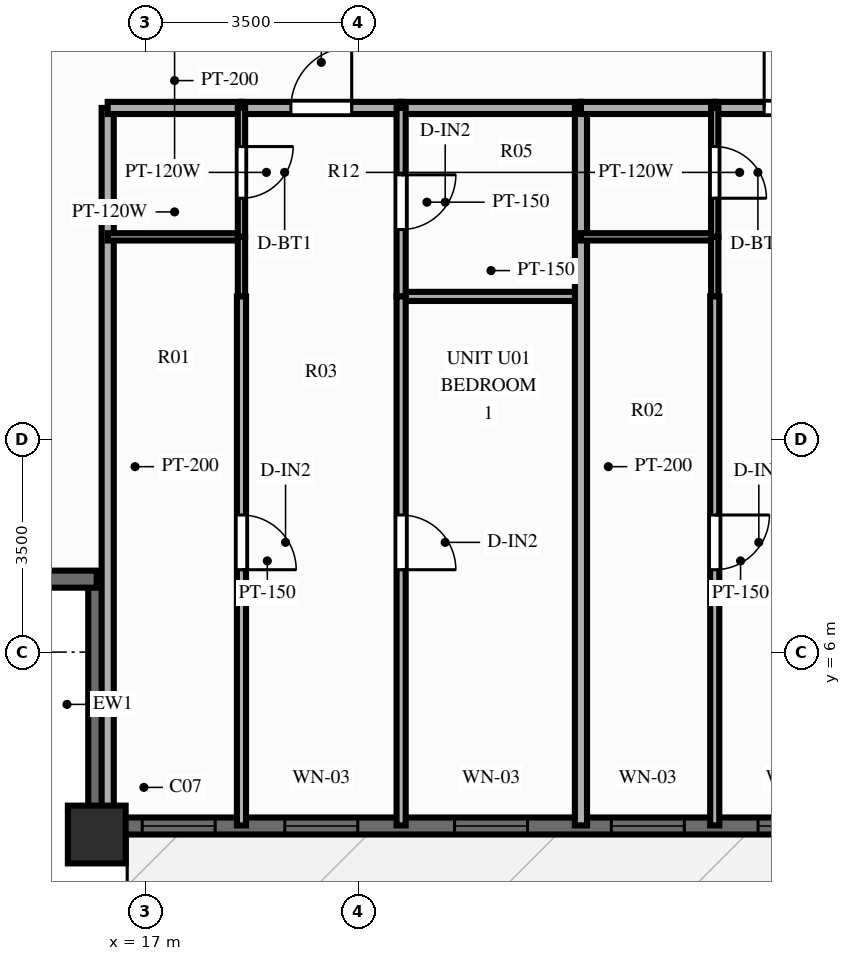
"""IFC4 building model, lengths in metres.
Left out: names, types, materials, properties, quantities, classifications, styles, units other than length and angle.
Written with IfcOpenShell. Run it as: python <this file> out.ifc"""

import sys

from ifc_helpers import new_model, si_unit, direction, frame, frame_2d, origin, origin_2d, place, context, subcontext, project, spatial, rectangle, extrude, source, transform, mapped, element, fill, save


model = new_model("IFC4")
c1 = context("Model", 3, precision=1e-05, world=origin(), true_north=direction((0.0, 1.0)))
c2 = subcontext(c1, "Body", "Model", "MODEL_VIEW")
j1 = project(units=[si_unit("LENGTHUNIT", "METRE"), si_unit("PLANEANGLEUNIT", "RADIAN")], contexts=[c1])
p1 = place(None, origin())
s1 = spatial("IfcSite", under=j1, at=p1, CompositionType="ELEMENT")
p2 = place(p1, origin())
s2 = spatial("IfcBuilding", under=s1, at=p2, CompositionType="ELEMENT")
p3 = place(p2, frame((0.0, 0.0, 83.85)))
s3 = spatial("IfcBuildingStorey", under=s2, at=p3, CompositionType="ELEMENT", Elevation=83.85)
m1 = source(origin(), c2, "Body", "SweptSolid", [
    extrude(rectangle(XDim=0.95, YDim=0.95, at=origin_2d()), origin(), (0.0, 0.0, 1.0), 3.0),
])
p4 = place(p3, frame((16.2, 3.0, 0.0), z_axis=(0.0, 0.0, 1.0), x_axis=(1.0, 0.0, 0.0)))
e1 = element("IfcColumn", 1, at=p4, inside=s3, PredefinedType="COLUMN", context=c2, shape_type="MappedRepresentation", body=[
    mapped(m1, transform((0.0, 0.0, 0.0), scale=1.0)),
])
p5 = place(p3, frame((16.2, 3.14, 0.0), z_axis=(0.0, 0.0, 1.0), x_axis=(1.0, 0.0, 0.0)))
e2 = element("IfcWall", 2, at=p5, inside=s3, PredefinedType="SOLIDWALL", context=c2, shape_type="SweptSolid", body=[
    extrude(rectangle(XDim=43.6, YDim=0.28, at=frame_2d((21.8, 0.0))), origin(), (0.0, 0.0, 1.0), 2.28),
])
p6 = place(p5, frame((0.748, 0.0, 0.25)))
e3 = element("IfcOpeningElement", 3, at=p6, cuts=e2, PredefinedType="OPENING", context=c2, shape_type="SweptSolid", body=[
    extrude(rectangle(XDim=1.2, YDim=1.5, at=frame_2d((0.6, 0.75))), frame((0.0, 0.152, 0.0), z_axis=(0.0, -1.0, 0.0), x_axis=(1.0, 0.0, 0.0)), (0.0, 0.0, 1.0), 0.304),
])
p7 = place(p5, frame((3.093, 0.0, 0.25)))
e4 = element("IfcOpeningElement", 4, at=p7, cuts=e2, PredefinedType="OPENING", context=c2, shape_type="SweptSolid", body=[
    extrude(rectangle(XDim=1.2, YDim=1.5, at=frame_2d((0.6, 0.75))), frame((0.0, 0.152, 0.0), z_axis=(0.0, -1.0, 0.0), x_axis=(1.0, 0.0, 0.0)), (0.0, 0.0, 1.0), 0.304),
])
p8 = place(p5, frame((5.885, 0.0, 0.25)))
e5 = element("IfcOpeningElement", 5, at=p8, cuts=e2, PredefinedType="OPENING", context=c2, shape_type="SweptSolid", body=[
    extrude(rectangle(XDim=1.2, YDim=1.5, at=frame_2d((0.6, 0.75))), frame((0.0, 0.152, 0.0), z_axis=(0.0, -1.0, 0.0), x_axis=(1.0, 0.0, 0.0)), (0.0, 0.0, 1.0), 0.304),
])
p9 = place(p5, frame((8.463, 0.0, 0.25)))
e6 = element("IfcOpeningElement", 6, at=p9, cuts=e2, PredefinedType="OPENING", context=c2, shape_type="SweptSolid", body=[
    extrude(rectangle(XDim=1.2, YDim=1.5, at=frame_2d((0.6, 0.75))), frame((0.0, 0.152, 0.0), z_axis=(0.0, -1.0, 0.0), x_axis=(1.0, 0.0, 0.0)), (0.0, 0.0, 1.0), 0.304),
])
p10 = place(p5, frame((10.876, 0.0, 0.25)))
e7 = element("IfcOpeningElement", 7, at=p10, cuts=e2, PredefinedType="OPENING", context=c2, shape_type="SweptSolid", body=[
    extrude(rectangle(XDim=1.2, YDim=1.5, at=frame_2d((0.6, 0.75))), frame((0.0, 0.152, 0.0), z_axis=(0.0, -1.0, 0.0), x_axis=(1.0, 0.0, 0.0)), (0.0, 0.0, 1.0), 0.304),
])
p11 = place(p5, frame((13.287, 0.0, 0.25)))
e8 = element("IfcOpeningElement", 8, at=p11, cuts=e2, PredefinedType="OPENING", context=c2, shape_type="SweptSolid", body=[
    extrude(rectangle(XDim=1.2, YDim=1.5, at=frame_2d((0.6, 0.75))), frame((0.0, 0.152, 0.0), z_axis=(0.0, -1.0, 0.0), x_axis=(1.0, 0.0, 0.0)), (0.0, 0.0, 1.0), 0.304),
])
p12 = place(p5, frame((16.521, 0.0, 0.25)))
e9 = element("IfcOpeningElement", 9, at=p12, cuts=e2, PredefinedType="OPENING", context=c2, shape_type="SweptSolid", body=[
    extrude(rectangle(XDim=1.2, YDim=1.5, at=frame_2d((0.6, 0.75))), frame((0.0, 0.152, 0.0), z_axis=(0.0, -1.0, 0.0), x_axis=(1.0, 0.0, 0.0)), (0.0, 0.0, 1.0), 0.304),
])
p13 = place(p5, frame((22.938, 0.0, 0.0), z_axis=(0.0, 0.0, 1.0), x_axis=(-1.0, 0.0, 0.0)))
e10 = element("IfcOpeningElement", 10, at=p13, cuts=e2, PredefinedType="OPENING", context=c2, shape_type="SweptSolid", body=[
    extrude(rectangle(XDim=1.1, YDim=2.15, at=frame_2d((0.55, 1.075))), frame((0.0, 0.152, 0.0), z_axis=(0.0, -1.0, 0.0), x_axis=(1.0, 0.0, 0.0)), (0.0, 0.0, 1.0), 0.304),
])
p14 = place(p5, frame((26.657, 0.0, 0.25)))
e11 = element("IfcOpeningElement", 11, at=p14, cuts=e2, PredefinedType="OPENING", context=c2, shape_type="SweptSolid", body=[
    extrude(rectangle(XDim=0.95, YDim=1.5, at=frame_2d((0.475, 0.75))), frame((0.0, 0.152, 0.0), z_axis=(0.0, -1.0, 0.0), x_axis=(1.0, 0.0, 0.0)), (0.0, 0.0, 1.0), 0.304),
])
p15 = place(p5, frame((28.965, 0.0, 0.25)))
e12 = element("IfcOpeningElement", 12, at=p15, cuts=e2, PredefinedType="OPENING", context=c2, shape_type="SweptSolid", body=[
    extrude(rectangle(XDim=0.7, YDim=1.5, at=frame_2d((0.35, 0.75))), frame((0.0, 0.152, 0.0), z_axis=(0.0, -1.0, 0.0), x_axis=(1.0, 0.0, 0.0)), (0.0, 0.0, 1.0), 0.304),
])
p16 = place(p5, frame((31.158, 0.0, 0.25)))
e13 = element("IfcOpeningElement", 13, at=p16, cuts=e2, PredefinedType="OPENING", context=c2, shape_type="SweptSolid", body=[
    extrude(rectangle(XDim=1.2, YDim=1.5, at=frame_2d((0.6, 0.75))), frame((0.0, 0.152, 0.0), z_axis=(0.0, -1.0, 0.0), x_axis=(1.0, 0.0, 0.0)), (0.0, 0.0, 1.0), 0.304),
])
p17 = place(p5, frame((35.992, 0.0, 0.25)))
e14 = element("IfcOpeningElement", 14, at=p17, cuts=e2, PredefinedType="OPENING", context=c2, shape_type="SweptSolid", body=[
    extrude(rectangle(XDim=1.2, YDim=1.5, at=frame_2d((0.6, 0.75))), frame((0.0, 0.152, 0.0), z_axis=(0.0, -1.0, 0.0), x_axis=(1.0, 0.0, 0.0)), (0.0, 0.0, 1.0), 0.304),
])
p18 = place(p5, frame((40.885, 0.0, 0.25)))
e15 = element("IfcOpeningElement", 15, at=p18, cuts=e2, PredefinedType="OPENING", context=c2, shape_type="SweptSolid", body=[
    extrude(rectangle(XDim=1.2, YDim=1.5, at=frame_2d((0.6, 0.75))), frame((0.0, 0.152, 0.0), z_axis=(0.0, -1.0, 0.0), x_axis=(1.0, 0.0, 0.0)), (0.0, 0.0, 1.0), 0.304),
])
for number, where, z_axis, x_axis in (
    (16, (16.2, 3.08, 0.0), (0.0, 0.0, 1.0), (0.0, 1.0, 0.0)),
    (17, (12.08, 7.2, 0.0), (0.0, 0.0, 1.0), (1.0, 0.0, 0.0)),
):
    element("IfcWall", number, at=place(p3, frame(where, z_axis=z_axis, x_axis=x_axis)), inside=s3, PredefinedType="SOLIDWALL", context=c2, shape_type="SweptSolid", body=[
        extrude(rectangle(XDim=4.12, YDim=0.28, at=frame_2d((2.06, 0.0))), origin(), (0.0, 0.0, 1.0), 2.28),
    ])
p19 = place(p3, frame((16.38, 14.95, 0.0), z_axis=(0.0, 0.0, 1.0), x_axis=(0.0, -1.0, 0.0)))
e18 = element("IfcWall", 18, at=p19, inside=s3, PredefinedType="PARTITIONING", context=c2, shape_type="SweptSolid", body=[
    extrude(rectangle(XDim=11.8, YDim=0.2, at=frame_2d((5.9, 0.0))), origin(), (0.0, 0.0, 1.0), 2.79),
])
p20 = place(p3, frame((16.38, 14.95, 0.0), z_axis=(0.0, 0.0, 1.0), x_axis=(1.0, 0.0, 0.0)))
e19 = element("IfcWall", 19, at=p20, inside=s3, PredefinedType="PARTITIONING", context=c2, shape_type="SweptSolid", body=[
    extrude(rectangle(XDim=2.2, YDim=0.2, at=frame_2d((1.1, 0.0))), origin(), (0.0, 0.0, 1.0), 2.79),
])
p21 = place(p3, frame((18.58, 14.95, 0.0), z_axis=(0.0, 0.0, 1.0), x_axis=(1.0, 0.0, 0.0)))
e20 = element("IfcWall", 20, at=p21, inside=s3, PredefinedType="PARTITIONING", context=c2, shape_type="SweptSolid", body=[
    extrude(rectangle(XDim=2.625, YDim=0.2, at=frame_2d((1.313, 0.0))), origin(), (0.0, 0.0, 1.0), 2.79),
])
p22 = place(p21, frame((0.813, 0.0, 0.0)))
e21 = element("IfcOpeningElement", 21, at=p22, cuts=e20, PredefinedType="OPENING", context=c2, shape_type="SweptSolid", body=[
    extrude(rectangle(XDim=1.0, YDim=2.15, at=frame_2d((0.5, 1.075))), frame((0.0, 0.112, 0.0), z_axis=(0.0, -1.0, 0.0), x_axis=(1.0, 0.0, 0.0)), (0.0, 0.0, 1.0), 0.224),
])
p23 = place(p3, frame((21.206, 14.95, 0.0), z_axis=(0.0, 0.0, 1.0), x_axis=(1.0, 0.0, 0.0)))
e22 = element("IfcWall", 22, at=p23, inside=s3, PredefinedType="PARTITIONING", context=c2, shape_type="SweptSolid", body=[
    extrude(rectangle(XDim=2.958, YDim=0.2, at=frame_2d((1.479, 0.0))), origin(), (0.0, 0.0, 1.0), 2.79),
])
p24 = place(p3, frame((16.38, 12.83, 0.0), z_axis=(0.0, 0.0, 1.0), x_axis=(1.0, 0.0, 0.0)))
e23 = element("IfcWall", 23, at=p24, inside=s3, PredefinedType="PARTITIONING", context=c2, shape_type="SweptSolid", body=[
    extrude(rectangle(XDim=2.2, YDim=0.12, at=frame_2d((1.1, 0.0))), origin(), (0.0, 0.0, 1.0), 2.79),
])
p25 = place(p3, frame((21.206, 11.85, 0.0), z_axis=(0.0, 0.0, 1.0), x_axis=(1.0, 0.0, 0.0)))
e24 = element("IfcWall", 24, at=p25, inside=s3, PredefinedType="PARTITIONING", context=c2, shape_type="SweptSolid", body=[
    extrude(rectangle(XDim=2.958, YDim=0.15, at=frame_2d((1.479, 0.0))), origin(), (0.0, 0.0, 1.0), 2.79),
])
p26 = place(p3, frame((18.58, 14.95, 0.0), z_axis=(0.0, 0.0, 1.0), x_axis=(0.0, -1.0, 0.0)))
e25 = element("IfcWall", 25, at=p26, inside=s3, PredefinedType="PARTITIONING", context=c2, shape_type="SweptSolid", body=[
    extrude(rectangle(XDim=2.12, YDim=0.12, at=frame_2d((1.06, 0.0))), origin(), (0.0, 0.0, 1.0), 2.79),
])
p27 = place(p26, frame((0.635, 0.0, 0.0)))
e26 = element("IfcOpeningElement", 26, at=p27, cuts=e25, PredefinedType="OPENING", context=c2, shape_type="SweptSolid", body=[
    extrude(rectangle(XDim=0.85, YDim=2.05, at=frame_2d((0.425, 1.025))), frame((0.0, 0.072, 0.0), z_axis=(0.0, -1.0, 0.0), x_axis=(1.0, 0.0, 0.0)), (0.0, 0.0, 1.0), 0.144),
])
p28 = place(p3, frame((18.58, 12.83, 0.0), z_axis=(0.0, 0.0, 1.0), x_axis=(0.0, -1.0, 0.0)))
e27 = element("IfcWall", 27, at=p28, inside=s3, PredefinedType="PARTITIONING", context=c2, shape_type="SweptSolid", body=[
    extrude(rectangle(XDim=0.98, YDim=0.12, at=frame_2d((0.49, 0.0))), origin(), (0.0, 0.0, 1.0), 2.79),
])
p29 = place(p3, frame((18.58, 11.85, 0.0), z_axis=(0.0, 0.0, 1.0), x_axis=(0.0, -1.0, 0.0)))
e28 = element("IfcWall", 28, at=p29, inside=s3, PredefinedType="PARTITIONING", context=c2, shape_type="SweptSolid", body=[
    extrude(rectangle(XDim=8.7, YDim=0.15, at=frame_2d((4.35, 0.0))), origin(), (0.0, 0.0, 1.0), 2.79),
])
p30 = place(p29, frame((3.595, 0.0, 0.0)))
e29 = element("IfcOpeningElement", 29, at=p30, cuts=e28, PredefinedType="OPENING", context=c2, shape_type="SweptSolid", body=[
    extrude(rectangle(XDim=0.9, YDim=2.1, at=frame_2d((0.45, 1.05))), frame((0.0, 0.087, 0.0), z_axis=(0.0, -1.0, 0.0), x_axis=(1.0, 0.0, 0.0)), (0.0, 0.0, 1.0), 0.174),
])
p31 = place(p3, frame((21.206, 14.95, 0.0), z_axis=(0.0, 0.0, 1.0), x_axis=(0.0, -1.0, 0.0)))
e30 = element("IfcWall", 30, at=p31, inside=s3, PredefinedType="PARTITIONING", context=c2, shape_type="SweptSolid", body=[
    extrude(rectangle(XDim=3.1, YDim=0.15, at=frame_2d((1.55, 0.0))), origin(), (0.0, 0.0, 1.0), 2.79),
])
p32 = place(p31, frame((1.1, 0.0, 0.0)))
e31 = element("IfcOpeningElement", 31, at=p32, cuts=e30, PredefinedType="OPENING", context=c2, shape_type="SweptSolid", body=[
    extrude(rectangle(XDim=0.9, YDim=2.1, at=frame_2d((0.45, 1.05))), frame((0.0, 0.087, 0.0), z_axis=(0.0, -1.0, 0.0), x_axis=(1.0, 0.0, 0.0)), (0.0, 0.0, 1.0), 0.174),
])
p33 = place(p3, frame((21.206, 11.85, 0.0), z_axis=(0.0, 0.0, 1.0), x_axis=(0.0, -1.0, 0.0)))
e32 = element("IfcWall", 32, at=p33, inside=s3, PredefinedType="PARTITIONING", context=c2, shape_type="SweptSolid", body=[
    extrude(rectangle(XDim=8.7, YDim=0.15, at=frame_2d((4.35, 0.0))), origin(), (0.0, 0.0, 1.0), 2.79),
])
p34 = place(p33, frame((3.595, 0.0, 0.0)))
e33 = element("IfcOpeningElement", 33, at=p34, cuts=e32, PredefinedType="OPENING", context=c2, shape_type="SweptSolid", body=[
    extrude(rectangle(XDim=0.9, YDim=2.1, at=frame_2d((0.45, 1.05))), frame((0.0, 0.087, 0.0), z_axis=(0.0, -1.0, 0.0), x_axis=(1.0, 0.0, 0.0)), (0.0, 0.0, 1.0), 0.174),
])
p35 = place(p3, frame((24.163, 14.95, 0.0), z_axis=(0.0, 0.0, 1.0), x_axis=(0.0, -1.0, 0.0)))
e34 = element("IfcWall", 34, at=p35, inside=s3, PredefinedType="PARTITIONING", context=c2, shape_type="SweptSolid", body=[
    extrude(rectangle(XDim=11.8, YDim=0.2, at=frame_2d((5.9, 0.0))), origin(), (0.0, 0.0, 1.0), 2.79),
])
p36 = place(p3, frame((24.163, 14.95, 0.0), z_axis=(0.0, 0.0, 1.0), x_axis=(1.0, 0.0, 0.0)))
e35 = element("IfcWall", 35, at=p36, inside=s3, PredefinedType="PARTITIONING", context=c2, shape_type="SweptSolid", body=[
    extrude(rectangle(XDim=2.2, YDim=0.2, at=frame_2d((1.1, 0.0))), origin(), (0.0, 0.0, 1.0), 2.79),
])
p37 = place(p3, frame((26.363, 14.95, 0.0), z_axis=(0.0, 0.0, 1.0), x_axis=(1.0, 0.0, 0.0)))
e36 = element("IfcWall", 36, at=p37, inside=s3, PredefinedType="PARTITIONING", context=c2, shape_type="SweptSolid", body=[
    extrude(rectangle(XDim=2.625, YDim=0.2, at=frame_2d((1.313, 0.0))), origin(), (0.0, 0.0, 1.0), 2.79),
])
p38 = place(p37, frame((0.813, 0.0, 0.0)))
e37 = element("IfcOpeningElement", 37, at=p38, cuts=e36, PredefinedType="OPENING", context=c2, shape_type="SweptSolid", body=[
    extrude(rectangle(XDim=1.0, YDim=2.15, at=frame_2d((0.5, 1.075))), frame((0.0, 0.112, 0.0), z_axis=(0.0, -1.0, 0.0), x_axis=(1.0, 0.0, 0.0)), (0.0, 0.0, 1.0), 0.224),
])
p39 = place(p3, frame((24.163, 12.83, 0.0), z_axis=(0.0, 0.0, 1.0), x_axis=(1.0, 0.0, 0.0)))
e38 = element("IfcWall", 38, at=p39, inside=s3, PredefinedType="PARTITIONING", context=c2, shape_type="SweptSolid", body=[
    extrude(rectangle(XDim=2.2, YDim=0.12, at=frame_2d((1.1, 0.0))), origin(), (0.0, 0.0, 1.0), 2.79),
])
p40 = place(p3, frame((26.363, 14.95, 0.0), z_axis=(0.0, 0.0, 1.0), x_axis=(0.0, -1.0, 0.0)))
e39 = element("IfcWall", 39, at=p40, inside=s3, PredefinedType="PARTITIONING", context=c2, shape_type="SweptSolid", body=[
    extrude(rectangle(XDim=2.12, YDim=0.12, at=frame_2d((1.06, 0.0))), origin(), (0.0, 0.0, 1.0), 2.79),
])
p41 = place(p40, frame((0.635, 0.0, 0.0)))
e40 = element("IfcOpeningElement", 40, at=p41, cuts=e39, PredefinedType="OPENING", context=c2, shape_type="SweptSolid", body=[
    extrude(rectangle(XDim=0.85, YDim=2.05, at=frame_2d((0.425, 1.025))), frame((0.0, 0.072, 0.0), z_axis=(0.0, -1.0, 0.0), x_axis=(1.0, 0.0, 0.0)), (0.0, 0.0, 1.0), 0.144),
])
p42 = place(p3, frame((26.363, 12.83, 0.0), z_axis=(0.0, 0.0, 1.0), x_axis=(0.0, -1.0, 0.0)))
e41 = element("IfcWall", 41, at=p42, inside=s3, PredefinedType="PARTITIONING", context=c2, shape_type="SweptSolid", body=[
    extrude(rectangle(XDim=0.98, YDim=0.12, at=frame_2d((0.49, 0.0))), origin(), (0.0, 0.0, 1.0), 2.79),
])
p43 = place(p3, frame((26.363, 11.85, 0.0), z_axis=(0.0, 0.0, 1.0), x_axis=(0.0, -1.0, 0.0)))
e42 = element("IfcWall", 42, at=p43, inside=s3, PredefinedType="PARTITIONING", context=c2, shape_type="SweptSolid", body=[
    extrude(rectangle(XDim=8.7, YDim=0.15, at=frame_2d((4.35, 0.0))), origin(), (0.0, 0.0, 1.0), 2.79),
])
p44 = place(p43, frame((3.595, 0.0, 0.0)))
e43 = element("IfcOpeningElement", 43, at=p44, cuts=e42, PredefinedType="OPENING", context=c2, shape_type="SweptSolid", body=[
    extrude(rectangle(XDim=0.9, YDim=2.1, at=frame_2d((0.45, 1.05))), frame((0.0, 0.087, 0.0), z_axis=(0.0, -1.0, 0.0), x_axis=(1.0, 0.0, 0.0)), (0.0, 0.0, 1.0), 0.174),
])
m2 = source(origin(), c2, "Body", "SweptSolid", [
    extrude(rectangle(XDim=1.2, YDim=1.5, at=frame_2d((0.6, 0.75))), frame((0.0, 0.03, 0.0), z_axis=(0.0, -1.0, 0.0), x_axis=(1.0, 0.0, 0.0)), (0.0, 0.0, 1.0), 0.06),
])
p45 = place(p6, origin())
e44 = element("IfcWindow", 44, at=p45, inside=s3, PartitioningType="SINGLE_PANEL", PredefinedType="WINDOW", context=c2, shape_type="MappedRepresentation", body=[
    mapped(m2, transform((0.0, 0.0, 0.0), scale=1.0)),
])
fill(e3, e44)
p46 = place(p7, origin())
e45 = element("IfcWindow", 45, at=p46, inside=s3, PartitioningType="SINGLE_PANEL", PredefinedType="WINDOW", context=c2, shape_type="MappedRepresentation", body=[
    mapped(m2, transform((0.0, 0.0, 0.0), scale=1.0)),
])
fill(e4, e45)
p47 = place(p8, origin())
e46 = element("IfcWindow", 46, at=p47, inside=s3, PartitioningType="SINGLE_PANEL", PredefinedType="WINDOW", context=c2, shape_type="MappedRepresentation", body=[
    mapped(m2, transform((0.0, 0.0, 0.0), scale=1.0)),
])
fill(e5, e46)
p48 = place(p9, origin())
e47 = element("IfcWindow", 47, at=p48, inside=s3, PartitioningType="SINGLE_PANEL", PredefinedType="WINDOW", context=c2, shape_type="MappedRepresentation", body=[
    mapped(m2, transform((0.0, 0.0, 0.0), scale=1.0)),
])
fill(e6, e47)
p49 = place(p10, origin())
e48 = element("IfcWindow", 48, at=p49, inside=s3, PartitioningType="SINGLE_PANEL", PredefinedType="WINDOW", context=c2, shape_type="MappedRepresentation", body=[
    mapped(m2, transform((0.0, 0.0, 0.0), scale=1.0)),
])
fill(e7, e48)
m3 = source(origin(), c2, "Body", "SweptSolid", [
    extrude(rectangle(XDim=1.0, YDim=2.15, at=frame_2d((0.5, 1.075))), frame((0.0, 0.025, 0.0), z_axis=(0.0, -1.0, 0.0), x_axis=(1.0, 0.0, 0.0)), (0.0, 0.0, 1.0), 0.05),
])
p50 = place(p22, origin())
e49 = element("IfcDoor", 49, at=p50, inside=s3, OperationType="SINGLE_SWING_RIGHT", PredefinedType="DOOR", context=c2, shape_type="MappedRepresentation", body=[
    mapped(m3, transform((0.0, 0.0, 0.0), scale=1.0)),
])
fill(e21, e49)
m4 = source(origin(), c2, "Body", "SweptSolid", [
    extrude(rectangle(XDim=0.85, YDim=2.05, at=frame_2d((0.425, 1.025))), frame((0.0, 0.025, 0.0), z_axis=(0.0, -1.0, 0.0), x_axis=(1.0, 0.0, 0.0)), (0.0, 0.0, 1.0), 0.05),
])
p51 = place(p27, origin())
e50 = element("IfcDoor", 50, at=p51, inside=s3, OperationType="SINGLE_SWING_LEFT", PredefinedType="DOOR", context=c2, shape_type="MappedRepresentation", body=[
    mapped(m4, transform((0.0, 0.0, 0.0), scale=1.0)),
])
fill(e26, e50)
m5 = source(origin(), c2, "Body", "SweptSolid", [
    extrude(rectangle(XDim=0.9, YDim=2.1, at=frame_2d((0.45, 1.05))), frame((0.0, 0.025, 0.0), z_axis=(0.0, -1.0, 0.0), x_axis=(1.0, 0.0, 0.0)), (0.0, 0.0, 1.0), 0.05),
])
p52 = place(p30, origin())
e51 = element("IfcDoor", 51, at=p52, inside=s3, OperationType="SINGLE_SWING_RIGHT", PredefinedType="DOOR", context=c2, shape_type="MappedRepresentation", body=[
    mapped(m5, transform((0.0, 0.0, 0.0), scale=1.0)),
])
fill(e29, e51)
p53 = place(p32, origin())
e52 = element("IfcDoor", 52, at=p53, inside=s3, OperationType="SINGLE_SWING_LEFT", PredefinedType="DOOR", context=c2, shape_type="MappedRepresentation", body=[
    mapped(m5, transform((0.0, 0.0, 0.0), scale=1.0)),
])
fill(e31, e52)
p54 = place(p34, origin())
e53 = element("IfcDoor", 53, at=p54, inside=s3, OperationType="SINGLE_SWING_RIGHT", PredefinedType="DOOR", context=c2, shape_type="MappedRepresentation", body=[
    mapped(m5, transform((0.0, 0.0, 0.0), scale=1.0)),
])
fill(e33, e53)
p55 = place(p38, origin())
e54 = element("IfcDoor", 54, at=p55, inside=s3, OperationType="SINGLE_SWING_LEFT", PredefinedType="DOOR", context=c2, shape_type="MappedRepresentation", body=[
    mapped(m3, transform((0.0, 0.0, 0.0), scale=1.0)),
])
fill(e37, e54)
p56 = place(p41, origin())
e55 = element("IfcDoor", 55, at=p56, inside=s3, OperationType="SINGLE_SWING_RIGHT", PredefinedType="DOOR", context=c2, shape_type="MappedRepresentation", body=[
    mapped(m4, transform((0.0, 0.0, 0.0), scale=1.0)),
])
fill(e40, e55)
p57 = place(p44, origin())
e56 = element("IfcDoor", 56, at=p57, inside=s3, OperationType="SINGLE_SWING_LEFT", PredefinedType="DOOR", context=c2, shape_type="MappedRepresentation", body=[
    mapped(m5, transform((0.0, 0.0, 0.0), scale=1.0)),
])
fill(e43, e56)
save(model, sys.argv[1])
